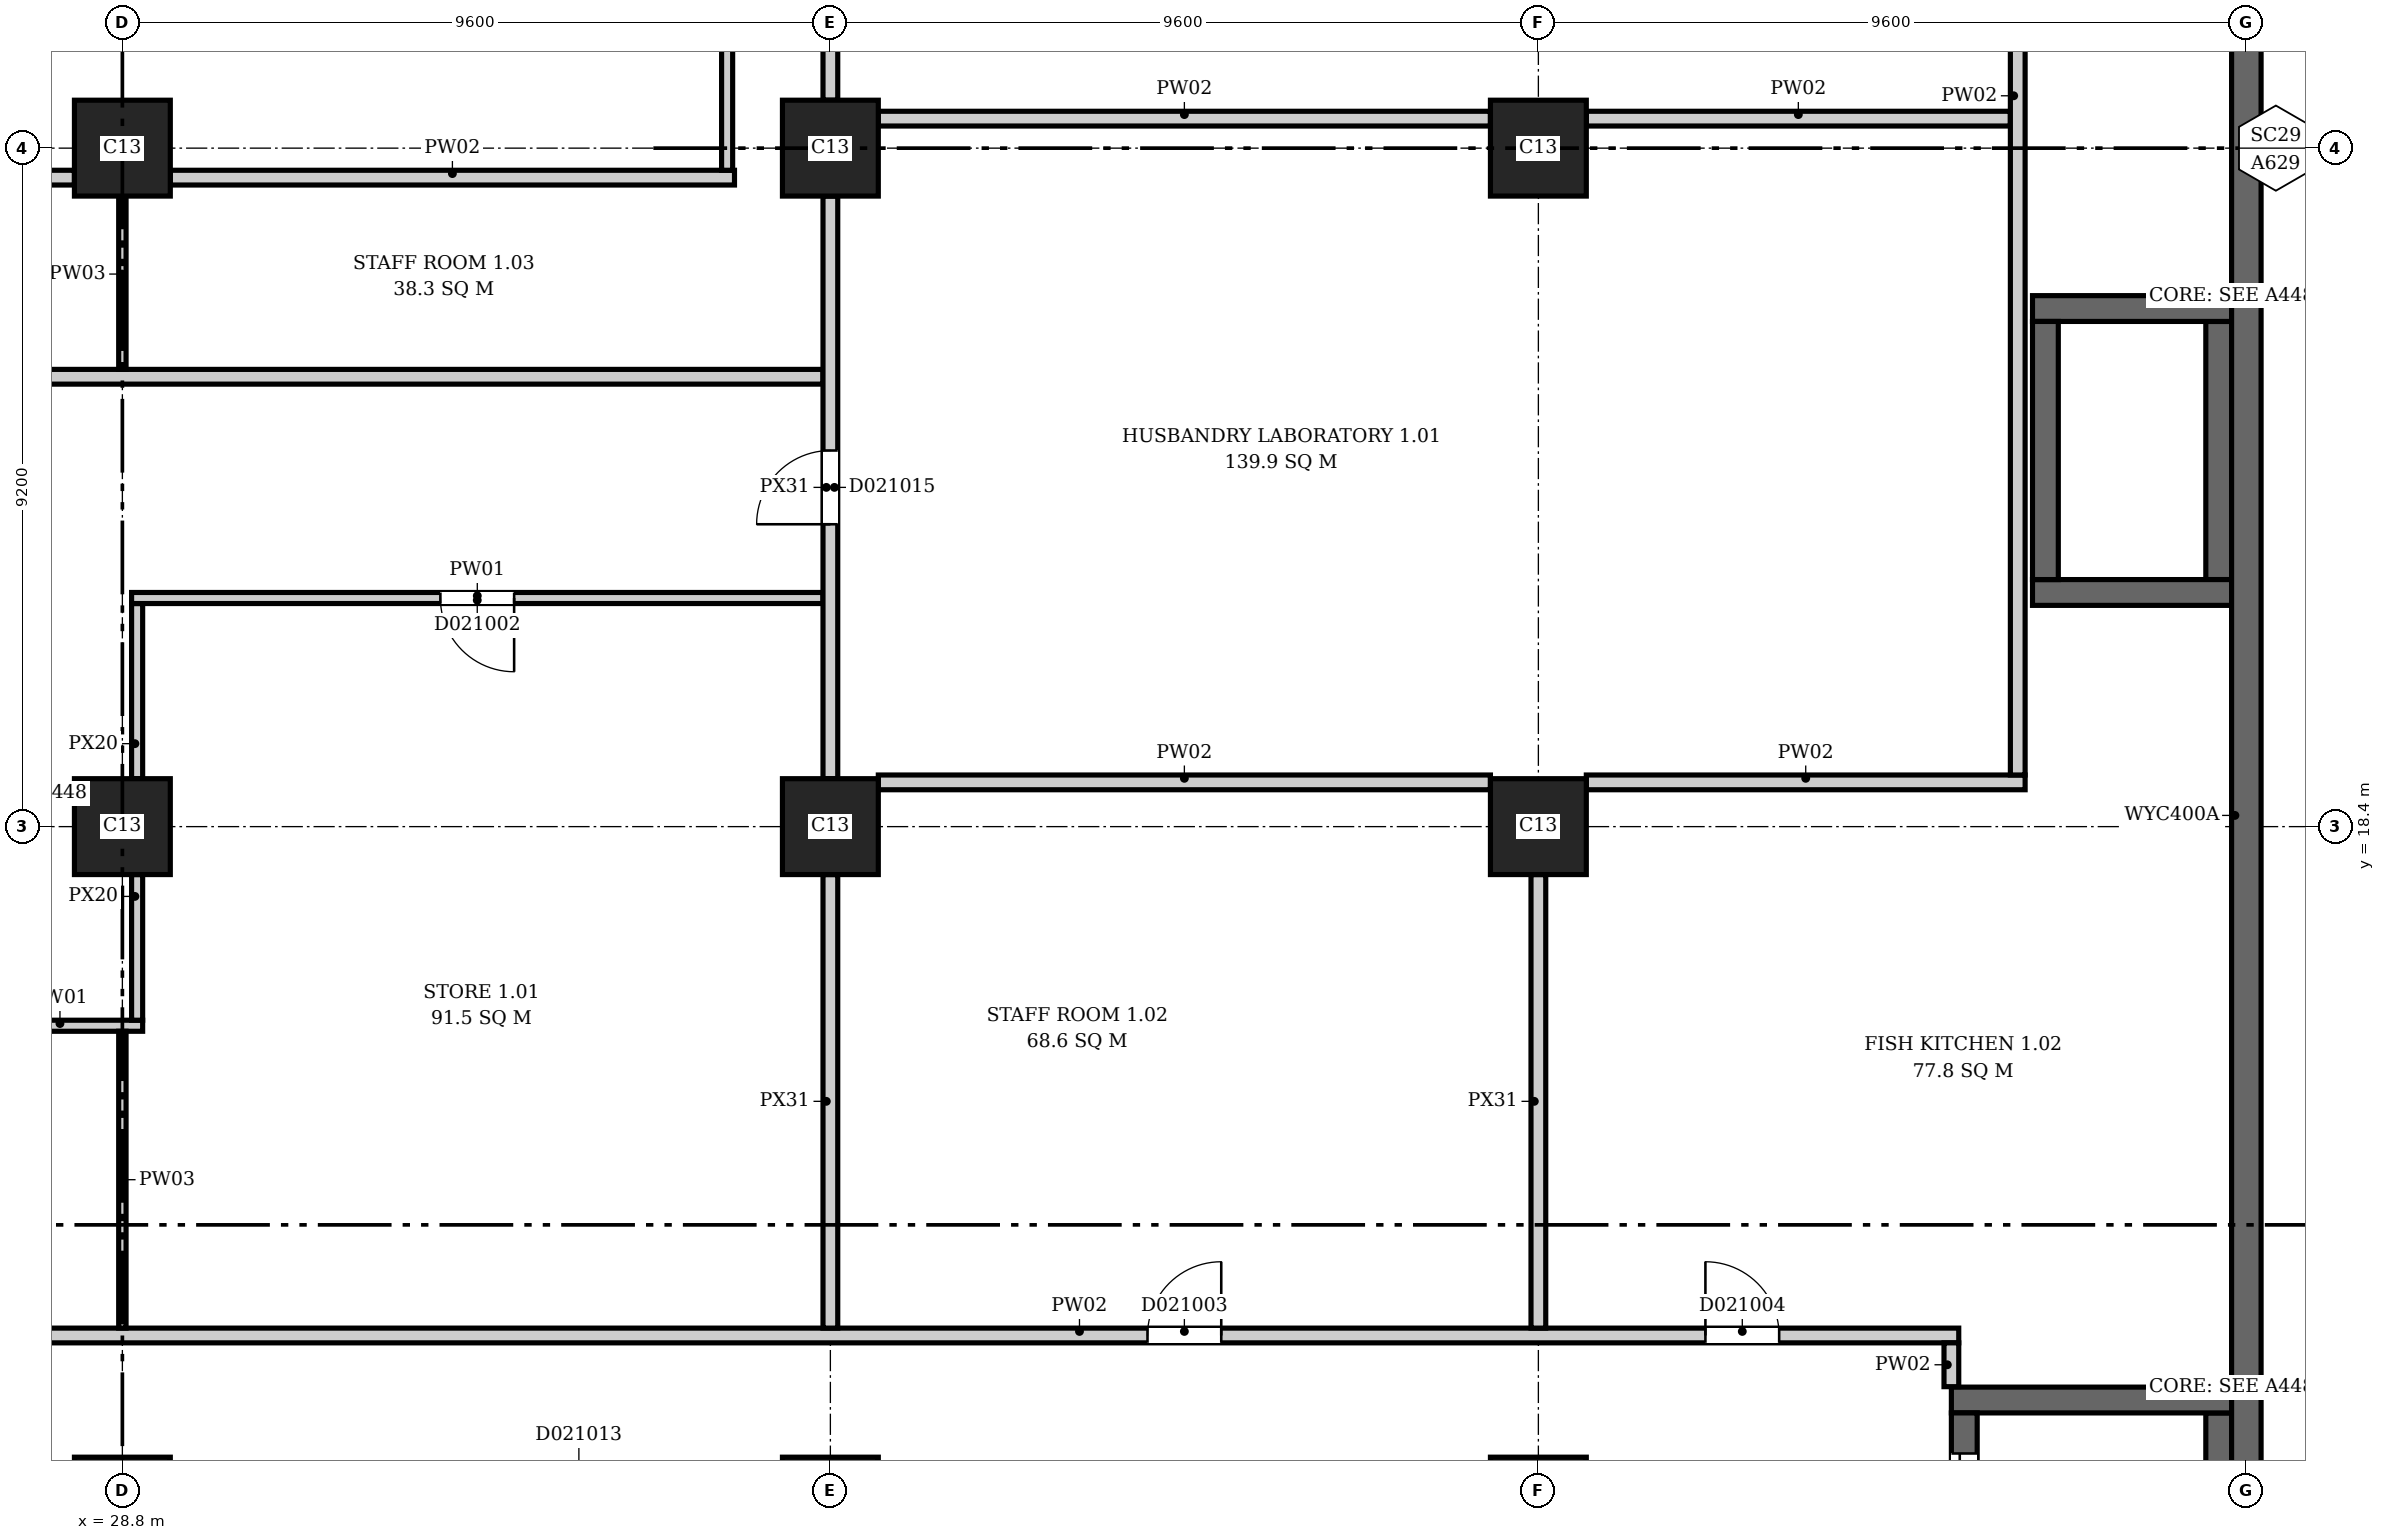
"""IFC4 building model, lengths in metres.
Left out: names, types, materials, properties, quantities, classifications, styles, units other than length and angle.
Written with IfcOpenShell. Run it as: python <this file> out.ifc"""

import sys

from ifc_helpers import new_model, si_unit, direction, frame, frame_2d, origin, origin_2d, place, context, subcontext, project, spatial, rectangle, extrude, element, fill, save


model = new_model("IFC4")
c1 = context("Model", 3, precision=1e-05, world=origin(), true_north=direction((0.0, 1.0)))
c2 = subcontext(c1, "Body", "Model", "MODEL_VIEW")
j1 = project(units=[si_unit("LENGTHUNIT", "METRE"), si_unit("PLANEANGLEUNIT", "RADIAN")], contexts=[c1])
p1 = place(None, origin())
s1 = spatial("IfcSite", under=j1, at=p1, CompositionType="ELEMENT")
p2 = place(p1, origin())
s2 = spatial("IfcBuilding", under=s1, at=p2, CompositionType="ELEMENT")
p3 = place(p2, frame((0.0, 0.0, 6.5)))
s3 = spatial("IfcBuildingStorey", under=s2, at=p3, CompositionType="ELEMENT", Elevation=6.5)
p4 = place(p3, frame((57.6, -0.2, 0.0), z_axis=(0.0, 0.0, 1.0), x_axis=(0.0, 1.0, 0.0)))
e1 = element("IfcWall", 1, at=p4, inside=s3, PredefinedType="SHEAR", context=c2, shape_type="SweptSolid", body=[
    extrude(rectangle(XDim=46.88, YDim=0.4, at=frame_2d((23.44, 0.0))), origin(), (0.0, 0.0, 1.0), 7.7),
])
p5 = place(p3, frame((53.6, 10.625, 0.0), z_axis=(0.0, 0.0, 1.0), x_axis=(1.0, 0.0, 0.0)))
e2 = element("IfcWall", 2, at=p5, inside=s3, PredefinedType="SHEAR", context=c2, shape_type="SweptSolid", body=[
    extrude(rectangle(XDim=3.8, YDim=0.35, at=frame_2d((1.9, 0.0))), origin(), (0.0, 0.0, 1.0), 7.7),
])
p6 = place(p3, frame((53.775, 8.25, 0.0), z_axis=(0.0, 0.0, 1.0), x_axis=(0.0, 1.0, 0.0)))
e3 = element("IfcWall", 3, at=p6, inside=s3, PredefinedType="SHEAR", context=c2, shape_type="SweptSolid", body=[
    extrude(rectangle(XDim=2.2, YDim=0.35, at=frame_2d((1.1, 0.0))), origin(), (0.0, 0.0, 1.0), 7.7),
])
p7 = place(p6, frame((0.55, 0.0, 0.0)))
e4 = element("IfcOpeningElement", 4, at=p7, cuts=e3, PredefinedType="OPENING", context=c2, shape_type="SweptSolid", body=[
    extrude(rectangle(XDim=1.1, YDim=2.1, at=frame_2d((0.55, 1.05))), frame((0.0, 0.185, 0.0), z_axis=(0.0, -1.0, 0.0), x_axis=(1.0, 0.0, 0.0)), (0.0, 0.0, 1.0), 0.37),
])
p8 = place(p3, frame((57.225, 8.25, 0.0), z_axis=(0.0, 0.0, 1.0), x_axis=(0.0, 1.0, 0.0)))
e5 = element("IfcWall", 5, at=p8, inside=s3, PredefinedType="SHEAR", context=c2, shape_type="SweptSolid", body=[
    extrude(rectangle(XDim=2.2, YDim=0.35, at=frame_2d((1.1, 0.0))), origin(), (0.0, 0.0, 1.0), 7.7),
])
for number, where, z_axis, x_axis in (
    (6, (54.7, 21.575, 0.0), (0.0, 0.0, 1.0), (1.0, 0.0, 0.0)),
    (7, (54.7, 25.425, 0.0), (0.0, 0.0, 1.0), (1.0, 0.0, 0.0)),
):
    element("IfcWall", number, at=place(p3, frame(where, z_axis=z_axis, x_axis=x_axis)), inside=s3, PredefinedType="SHEAR", context=c2, shape_type="SweptSolid", body=[
        extrude(rectangle(XDim=2.7, YDim=0.35, at=frame_2d((1.35, 0.0))), origin(), (0.0, 0.0, 1.0), 7.7),
    ])
for number, where, z_axis, x_axis in (
    (8, (54.875, 21.75, 0.0), (0.0, 0.0, 1.0), (0.0, 1.0, 0.0)),
    (9, (57.225, 21.75, 0.0), (0.0, 0.0, 1.0), (0.0, 1.0, 0.0)),
):
    element("IfcWall", number, at=place(p3, frame(where, z_axis=z_axis, x_axis=x_axis)), inside=s3, PredefinedType="SHEAR", context=c2, shape_type="SweptSolid", body=[
        extrude(rectangle(XDim=3.5, YDim=0.35, at=frame_2d((1.75, 0.0))), origin(), (0.0, 0.0, 1.0), 7.7),
    ])
for number, where, z_axis, x_axis in (
    (10, (28.8, 9.2, 0.0), (0.0, 0.0, 1.0), (1.0, 0.0, 0.0)),
    (11, (38.4, 9.2, 0.0), (0.0, 0.0, 1.0), (1.0, 0.0, 0.0)),
    (12, (48.0, 9.2, 0.0), (0.0, 0.0, 1.0), (1.0, 0.0, 0.0)),
    (13, (28.8, 18.4, 0.0), (0.0, 0.0, 1.0), (1.0, 0.0, 0.0)),
    (14, (38.4, 18.4, 0.0), (0.0, 0.0, 1.0), (1.0, 0.0, 0.0)),
    (15, (48.0, 18.4, 0.0), (0.0, 0.0, 1.0), (1.0, 0.0, 0.0)),
    (16, (28.8, 27.6, 0.0), (0.0, 0.0, 1.0), (1.0, 0.0, 0.0)),
    (17, (38.4, 27.6, 0.0), (0.0, 0.0, 1.0), (1.0, 0.0, 0.0)),
    (18, (48.0, 27.6, 0.0), (0.0, 0.0, 1.0), (1.0, 0.0, 0.0)),
):
    element("IfcColumn", number, at=place(p3, frame(where, z_axis=z_axis, x_axis=x_axis)), inside=s3, PredefinedType="COLUMN", context=c2, shape_type="SweptSolid", body=[
        extrude(rectangle(XDim=1.3, YDim=1.3, at=origin_2d()), origin(), (0.0, 0.0, 1.0), 7.7),
    ])
p9 = place(p3, frame((0.206, 24.5, 0.0), z_axis=(0.0, 0.0, 1.0), x_axis=(1.0, 0.0, 0.0)))
e19 = element("IfcWall", 19, at=p9, inside=s3, PredefinedType="PARTITIONING", context=c2, shape_type="SweptSolid", body=[
    extrude(rectangle(XDim=38.094, YDim=0.2, at=frame_2d((19.047, 0.0))), origin(), (0.0, 0.0, 1.0), 7.35),
])
p10 = place(p3, frame((19.85, 27.2, 0.0), z_axis=(0.0, 0.0, 1.0), x_axis=(1.0, 0.0, 0.0)))
e20 = element("IfcWall", 20, at=p10, inside=s3, PredefinedType="PARTITIONING", context=c2, shape_type="SweptSolid", body=[
    extrude(rectangle(XDim=8.3, YDim=0.2, at=frame_2d((4.15, 0.0))), origin(), (0.0, 0.0, 1.0), 7.35),
])
p11 = place(p10, frame((3.65, 0.0, 0.0)))
e21 = element("IfcOpeningElement", 21, at=p11, cuts=e20, PredefinedType="OPENING", context=c2, shape_type="SweptSolid", body=[
    extrude(rectangle(XDim=1.0, YDim=2.1, at=frame_2d((0.5, 1.05))), frame((0.0, 0.11, 0.0), z_axis=(0.0, -1.0, 0.0), x_axis=(1.0, 0.0, 0.0)), (0.0, 0.0, 1.0), 0.22),
])
p12 = place(p3, frame((27.206, 11.5, 0.0), z_axis=(0.0, 0.0, 1.0), x_axis=(1.0, 0.0, 0.0)))
e22 = element("IfcWall", 22, at=p12, inside=s3, PredefinedType="PARTITIONING", context=c2, shape_type="SweptSolid", body=[
    extrude(rectangle(XDim=26.494, YDim=0.2, at=frame_2d((13.247, 0.0))), origin(), (0.0, 0.0, 1.0), 7.35),
])
p13 = place(p12, frame((15.494, 0.0, 0.0)))
e23 = element("IfcOpeningElement", 23, at=p13, cuts=e22, PredefinedType="OPENING", context=c2, shape_type="SweptSolid", body=[
    extrude(rectangle(XDim=1.0, YDim=2.1, at=frame_2d((0.5, 1.05))), frame((0.0, 0.11, 0.0), z_axis=(0.0, -1.0, 0.0), x_axis=(1.0, 0.0, 0.0)), (0.0, 0.0, 1.0), 0.22),
])
p14 = place(p12, frame((23.059, 0.0, 0.0)))
e24 = element("IfcOpeningElement", 24, at=p14, cuts=e22, PredefinedType="OPENING", context=c2, shape_type="SweptSolid", body=[
    extrude(rectangle(XDim=1.0, YDim=2.1, at=frame_2d((0.5, 1.05))), frame((0.0, 0.11, 0.0), z_axis=(0.0, -1.0, 0.0), x_axis=(1.0, 0.0, 0.0)), (0.0, 0.0, 1.0), 0.22),
])
p15 = place(p3, frame((27.206, 15.7, 0.0), z_axis=(0.0, 0.0, 1.0), x_axis=(1.0, 0.0, 0.0)))
e25 = element("IfcWall", 25, at=p15, inside=s3, PredefinedType="PARTITIONING", context=c2, shape_type="SweptSolid", body=[
    extrude(rectangle(XDim=1.869, YDim=0.15, at=frame_2d((0.935, 0.0))), origin(), (0.0, 0.0, 1.0), 7.35),
])
p16 = place(p3, frame((28.8, 11.6, 0.0), z_axis=(0.0, 0.0, 1.0), x_axis=(0.0, 1.0, 0.0)))
e26 = element("IfcWall", 26, at=p16, inside=s3, PredefinedType="PARTITIONING", context=c2, shape_type="SweptSolid", body=[
    extrude(rectangle(XDim=4.025, YDim=0.1, at=frame_2d((2.012, 0.0))), origin(), (0.0, 0.0, 1.0), 6.95),
])
p17 = place(p3, frame((28.8, 24.6, 0.0), z_axis=(0.0, 0.0, 1.0), x_axis=(0.0, 1.0, 0.0)))
e27 = element("IfcWall", 27, at=p17, inside=s3, PredefinedType="PARTITIONING", context=c2, shape_type="SweptSolid", body=[
    extrude(rectangle(XDim=2.35, YDim=0.1, at=frame_2d((1.175, 0.0))), origin(), (0.0, 0.0, 1.0), 6.95),
])
p18 = place(p3, frame((29.0, 15.775, 0.0), z_axis=(0.0, 0.0, 1.0), x_axis=(0.0, 1.0, 0.0)))
e28 = element("IfcWall", 28, at=p18, inside=s3, PredefinedType="PARTITIONING", context=c2, shape_type="SweptSolid", body=[
    extrude(rectangle(XDim=1.975, YDim=0.15, at=frame_2d((0.988, 0.0))), origin(), (0.0, 0.0, 1.0), 6.95),
])
p19 = place(p3, frame((29.0, 19.05, 0.0), z_axis=(0.0, 0.0, 1.0), x_axis=(0.0, 1.0, 0.0)))
e29 = element("IfcWall", 29, at=p19, inside=s3, PredefinedType="PARTITIONING", context=c2, shape_type="SweptSolid", body=[
    extrude(rectangle(XDim=2.375, YDim=0.15, at=frame_2d((1.188, 0.0))), origin(), (0.0, 0.0, 1.0), 6.95),
])
p20 = place(p3, frame((28.925, 21.5, 0.0), z_axis=(0.0, 0.0, 1.0), x_axis=(1.0, 0.0, 0.0)))
e30 = element("IfcWall", 30, at=p20, inside=s3, PredefinedType="PARTITIONING", context=c2, shape_type="SweptSolid", body=[
    extrude(rectangle(XDim=9.375, YDim=0.15, at=frame_2d((4.688, 0.0))), origin(), (0.0, 0.0, 1.0), 7.35),
])
p21 = place(p20, frame((4.187, 0.0, 0.0)))
e31 = element("IfcOpeningElement", 31, at=p21, cuts=e30, PredefinedType="OPENING", context=c2, shape_type="SweptSolid", body=[
    extrude(rectangle(XDim=1.0, YDim=2.1, at=frame_2d((0.5, 1.05))), frame((0.0, 0.085, 0.0), z_axis=(0.0, -1.0, 0.0), x_axis=(1.0, 0.0, 0.0)), (0.0, 0.0, 1.0), 0.17),
])
p22 = place(p3, frame((29.45, 27.2, 0.0), z_axis=(0.0, 0.0, 1.0), x_axis=(1.0, 0.0, 0.0)))
e32 = element("IfcWall", 32, at=p22, inside=s3, PredefinedType="PARTITIONING", context=c2, shape_type="SweptSolid", body=[
    extrude(rectangle(XDim=7.65, YDim=0.2, at=frame_2d((3.825, 0.0))), origin(), (0.0, 0.0, 1.0), 7.35),
])
p23 = place(p3, frame((37.0, 27.3, 0.0), z_axis=(0.0, 0.0, 1.0), x_axis=(0.0, 1.0, 0.0)))
e33 = element("IfcWall", 33, at=p23, inside=s3, PredefinedType="PARTITIONING", context=c2, shape_type="SweptSolid", body=[
    extrude(rectangle(XDim=3.625, YDim=0.15, at=frame_2d((1.812, 0.0))), origin(), (0.0, 0.0, 1.0), 7.35),
])
p24 = place(p3, frame((38.4, 11.6, 0.0), z_axis=(0.0, 0.0, 1.0), x_axis=(0.0, 1.0, 0.0)))
e34 = element("IfcWall", 34, at=p24, inside=s3, PredefinedType="PARTITIONING", context=c2, shape_type="SweptSolid", body=[
    extrude(rectangle(XDim=6.15, YDim=0.2, at=frame_2d((3.075, 0.0))), origin(), (0.0, 0.0, 1.0), 6.95),
])
p25 = place(p3, frame((38.4, 19.05, 0.0), z_axis=(0.0, 0.0, 1.0), x_axis=(0.0, 1.0, 0.0)))
e35 = element("IfcWall", 35, at=p25, inside=s3, PredefinedType="PARTITIONING", context=c2, shape_type="SweptSolid", body=[
    extrude(rectangle(XDim=7.9, YDim=0.2, at=frame_2d((3.95, 0.0))), origin(), (0.0, 0.0, 1.0), 6.95),
])
p26 = place(p25, frame((3.45, 0.0, 0.0)))
e36 = element("IfcOpeningElement", 36, at=p26, cuts=e35, PredefinedType="OPENING", context=c2, shape_type="SweptSolid", body=[
    extrude(rectangle(XDim=1.0, YDim=2.1, at=frame_2d((0.5, 1.05))), frame((0.0, 0.11, 0.0), z_axis=(0.0, -1.0, 0.0), x_axis=(1.0, 0.0, 0.0)), (0.0, 0.0, 1.0), 0.22),
])
p27 = place(p3, frame((38.4, 28.25, 0.0), z_axis=(0.0, 0.0, 1.0), x_axis=(0.0, 1.0, 0.0)))
e37 = element("IfcWall", 37, at=p27, inside=s3, PredefinedType="PARTITIONING", context=c2, shape_type="SweptSolid", body=[
    extrude(rectangle(XDim=6.2, YDim=0.2, at=frame_2d((3.1, 0.0))), origin(), (0.0, 0.0, 1.0), 6.95),
])
for number, where, z_axis, x_axis in (
    (38, (39.05, 19.0, 0.0), (0.0, 0.0, 1.0), (1.0, 0.0, 0.0)),
    (39, (39.05, 28.0, 0.0), (0.0, 0.0, 1.0), (1.0, 0.0, 0.0)),
):
    element("IfcWall", number, at=place(p3, frame(where, z_axis=z_axis, x_axis=x_axis)), inside=s3, PredefinedType="PARTITIONING", context=c2, shape_type="SweptSolid", body=[
        extrude(rectangle(XDim=8.3, YDim=0.2, at=frame_2d((4.15, 0.0))), origin(), (0.0, 0.0, 1.0), 7.35),
    ])
p28 = place(p3, frame((48.0, 11.6, 0.0), z_axis=(0.0, 0.0, 1.0), x_axis=(0.0, 1.0, 0.0)))
e40 = element("IfcWall", 40, at=p28, inside=s3, PredefinedType="PARTITIONING", context=c2, shape_type="SweptSolid", body=[
    extrude(rectangle(XDim=6.15, YDim=0.2, at=frame_2d((3.075, 0.0))), origin(), (0.0, 0.0, 1.0), 6.95),
])
p29 = place(p3, frame((48.65, 19.0, 0.0), z_axis=(0.0, 0.0, 1.0), x_axis=(1.0, 0.0, 0.0)))
e41 = element("IfcWall", 41, at=p29, inside=s3, PredefinedType="PARTITIONING", context=c2, shape_type="SweptSolid", body=[
    extrude(rectangle(XDim=5.95, YDim=0.2, at=frame_2d((2.975, 0.0))), origin(), (0.0, 0.0, 1.0), 7.35),
])
p30 = place(p3, frame((48.65, 28.0, 0.0), z_axis=(0.0, 0.0, 1.0), x_axis=(1.0, 0.0, 0.0)))
e42 = element("IfcWall", 42, at=p30, inside=s3, PredefinedType="PARTITIONING", context=c2, shape_type="SweptSolid", body=[
    extrude(rectangle(XDim=5.75, YDim=0.2, at=frame_2d((2.875, 0.0))), origin(), (0.0, 0.0, 1.0), 7.35),
])
p31 = place(p3, frame((53.6, 10.806, 0.0), z_axis=(0.0, 0.0, 1.0), x_axis=(0.0, 1.0, 0.0)))
e43 = element("IfcWall", 43, at=p31, inside=s3, PredefinedType="PARTITIONING", context=c2, shape_type="SweptSolid", body=[
    extrude(rectangle(XDim=0.594, YDim=0.2, at=frame_2d((0.297, 0.0))), origin(), (0.0, 0.0, 1.0), 7.35),
])
p32 = place(p3, frame((54.5, 19.1, 0.0), z_axis=(0.0, 0.0, 1.0), x_axis=(0.0, 1.0, 0.0)))
e44 = element("IfcWall", 44, at=p32, inside=s3, PredefinedType="PARTITIONING", context=c2, shape_type="SweptSolid", body=[
    extrude(rectangle(XDim=15.35, YDim=0.2, at=frame_2d((7.675, 0.0))), origin(), (0.0, 0.0, 1.0), 7.35),
])
p33 = place(p7, origin())
e45 = element("IfcDoor", 45, at=p33, inside=s3, OperationType="DOUBLE_DOOR_SLIDING", PredefinedType="DOOR", context=c2, shape_type="SweptSolid", body=[
    extrude(rectangle(XDim=1.1, YDim=2.1, at=frame_2d((0.55, 1.05))), frame((0.0, 0.025, 0.0), z_axis=(0.0, -1.0, 0.0), x_axis=(1.0, 0.0, 0.0)), (0.0, 0.0, 1.0), 0.05),
])
fill(e4, e45)
p34 = place(p21, origin())
e46 = element("IfcDoor", 46, at=p34, inside=s3, OperationType="SINGLE_SWING_RIGHT", PredefinedType="DOOR", context=c2, shape_type="SweptSolid", body=[
    extrude(rectangle(XDim=1.0, YDim=2.1, at=frame_2d((0.5, 1.05))), frame((0.0, 0.025, 0.0), z_axis=(0.0, -1.0, 0.0), x_axis=(1.0, 0.0, 0.0)), (0.0, 0.0, 1.0), 0.05),
])
fill(e31, e46)
p35 = place(p13, origin())
e47 = element("IfcDoor", 47, at=p35, inside=s3, OperationType="SINGLE_SWING_RIGHT", PredefinedType="DOOR", context=c2, shape_type="SweptSolid", body=[
    extrude(rectangle(XDim=1.0, YDim=2.1, at=frame_2d((0.5, 1.05))), frame((0.0, 0.025, 0.0), z_axis=(0.0, -1.0, 0.0), x_axis=(1.0, 0.0, 0.0)), (0.0, 0.0, 1.0), 0.05),
])
fill(e23, e47)
p36 = place(p14, origin())
e48 = element("IfcDoor", 48, at=p36, inside=s3, OperationType="SINGLE_SWING_LEFT", PredefinedType="DOOR", context=c2, shape_type="SweptSolid", body=[
    extrude(rectangle(XDim=1.0, YDim=2.1, at=frame_2d((0.5, 1.05))), frame((0.0, 0.025, 0.0), z_axis=(0.0, -1.0, 0.0), x_axis=(1.0, 0.0, 0.0)), (0.0, 0.0, 1.0), 0.05),
])
fill(e24, e48)
p37 = place(p26, origin())
e49 = element("IfcDoor", 49, at=p37, inside=s3, OperationType="SINGLE_SWING_LEFT", PredefinedType="DOOR", context=c2, shape_type="SweptSolid", body=[
    extrude(rectangle(XDim=1.0, YDim=2.1, at=frame_2d((0.5, 1.05))), frame((0.0, 0.025, 0.0), z_axis=(0.0, -1.0, 0.0), x_axis=(1.0, 0.0, 0.0)), (0.0, 0.0, 1.0), 0.05),
])
fill(e36, e49)
save(model, sys.argv[1])
